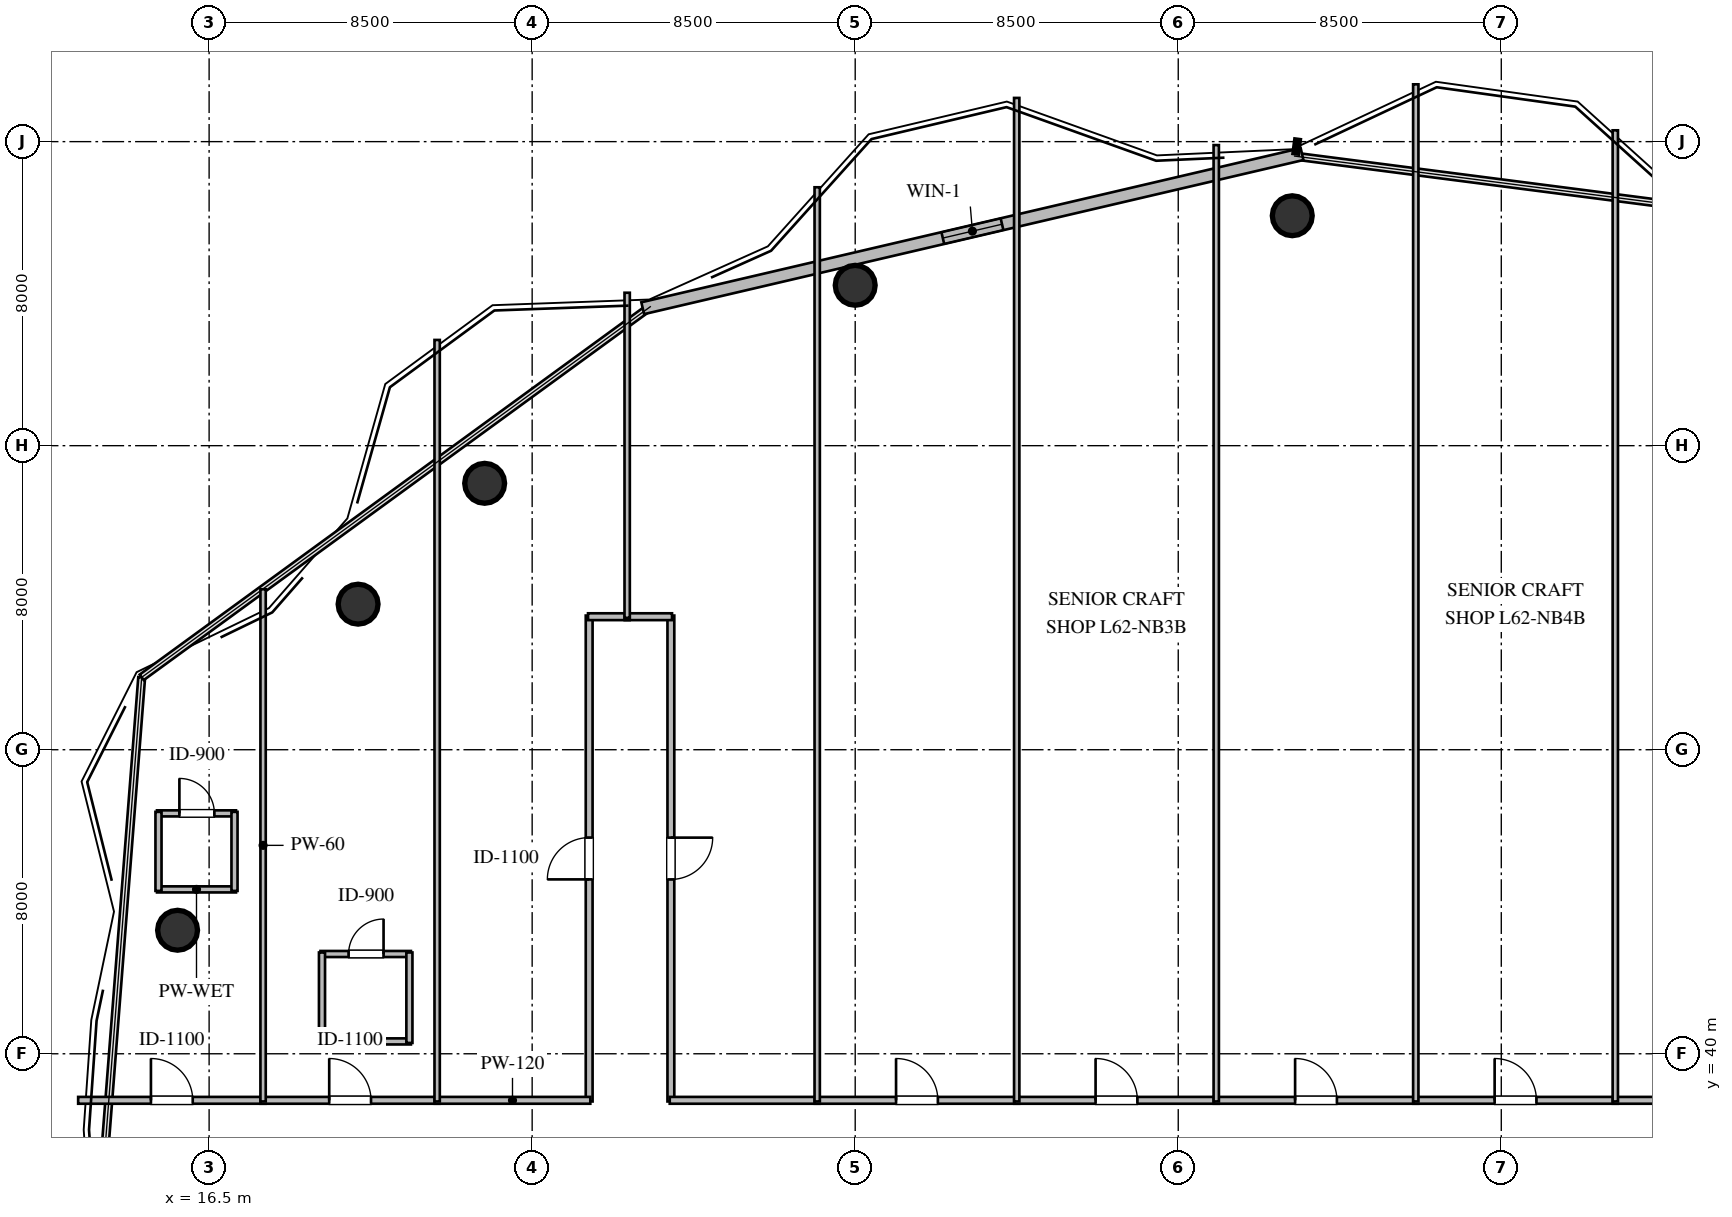
"""IFC4 building model, lengths in metres.
Left out: names, types, materials, properties, quantities, classifications, styles, units other than length and angle.
Written with IfcOpenShell. Run it as: python <this file> out.ifc"""

import sys

from ifc_helpers import new_model, si_unit, direction, frame, frame_2d, origin, origin_2d, place, context, subcontext, project, spatial, rectangle, circle, extrude, element, fill, save


model = new_model("IFC4")
c1 = context("Model", 3, precision=1e-05, world=origin(), true_north=direction((0.0, 1.0)))
c2 = subcontext(c1, "Body", "Model", "MODEL_VIEW")
j1 = project(units=[si_unit("LENGTHUNIT", "METRE"), si_unit("PLANEANGLEUNIT", "RADIAN")], contexts=[c1])
p1 = place(None, origin())
s1 = spatial("IfcSite", under=j1, at=p1, CompositionType="ELEMENT")
p2 = place(p1, origin())
s2 = spatial("IfcBuilding", under=s1, at=p2, CompositionType="ELEMENT")
p3 = place(p2, frame((0.0, 0.0, 235.2)))
s3 = spatial("IfcBuildingStorey", under=s2, at=p3, CompositionType="ELEMENT", Elevation=235.2)
for number, where, z_axis, x_axis in (
    (1, (45.0, 62.05, 0.0), (0.0, 0.0, 1.0), (1.0, 0.0, 0.0)),
    (2, (33.5, 60.22, 0.0), (0.0, 0.0, 1.0), (1.0, 0.0, 0.0)),
    (3, (23.75, 55.01, 0.0), (0.0, 0.0, 1.0), (1.0, 0.0, 0.0)),
    (4, (20.42, 51.83, 0.0), (0.0, 0.0, 1.0), (1.0, 0.0, 0.0)),
    (5, (15.67, 43.25, 0.0), (0.0, 0.0, 1.0), (1.0, 0.0, 0.0)),
):
    element("IfcColumn", number, at=place(p3, frame(where, z_axis=z_axis, x_axis=x_axis)), inside=s3, PredefinedType="COLUMN", context=c2, shape_type="SweptSolid", body=[
        extrude(circle(Radius=0.525, at=origin_2d()), origin(), (0.0, 0.0, 1.0), 3.6),
    ])
p4 = place(p3, frame((27.909, 59.617, 0.0), z_axis=(0.0, 0.0, 1.0), x_axis=(0.973753606594, 0.227604731158, 0.0)))
e6 = element("IfcWall", 6, at=p4, inside=s3, PredefinedType="STANDARD", context=c2, shape_type="SweptSolid", body=[
    extrude(rectangle(XDim=17.817, YDim=0.32, at=frame_2d((8.908, 0.0))), origin(), (0.0, 0.0, 1.0), 3.36),
])
p5 = place(p4, frame((8.109, 0.0, 1.05)))
e7 = element("IfcOpeningElement", 7, at=p5, cuts=e6, PredefinedType="OPENING", context=c2, shape_type="SweptSolid", body=[
    extrude(rectangle(XDim=1.6, YDim=1.5, at=frame_2d((0.8, 0.75))), frame((0.0, 0.17, 0.0), z_axis=(0.0, -1.0, 0.0), x_axis=(1.0, 0.0, 0.0)), (0.0, 0.0, 1.0), 0.34),
])
p6 = place(p3, frame((15.128, 44.325, 0.0), z_axis=(0.0, 0.0, 1.0), x_axis=(1.0, 0.0, 0.0)))
e8 = element("IfcWall", 8, at=p6, inside=s3, PredefinedType="PLUMBINGWALL", context=c2, shape_type="SweptSolid", body=[
    extrude(rectangle(XDim=2.08, YDim=0.16, at=frame_2d((1.04, 0.0))), origin(), (0.0, 0.0, 1.0), 3.36),
])
p7 = place(p3, frame((15.128, 46.325, 0.0), z_axis=(0.0, 0.0, 1.0), x_axis=(1.0, 0.0, 0.0)))
e9 = element("IfcWall", 9, at=p7, inside=s3, PredefinedType="PLUMBINGWALL", context=c2, shape_type="SweptSolid", body=[
    extrude(rectangle(XDim=2.08, YDim=0.16, at=frame_2d((1.04, 0.0))), origin(), (0.0, 0.0, 1.0), 3.36),
])
p8 = place(p7, frame((0.59, 0.0, 0.0)))
e10 = element("IfcOpeningElement", 10, at=p8, cuts=e9, PredefinedType="OPENING", context=c2, shape_type="SweptSolid", body=[
    extrude(rectangle(XDim=0.92, YDim=2.1, at=frame_2d((0.46, 1.05))), frame((0.0, 0.09, 0.0), z_axis=(0.0, -1.0, 0.0), x_axis=(1.0, 0.0, 0.0)), (0.0, 0.0, 1.0), 0.18),
])
for number, where, z_axis, x_axis in (
    (11, (15.168, 44.285, 0.0), (0.0, 0.0, 1.0), (0.0, 1.0, 0.0)),
    (12, (17.168, 44.285, 0.0), (0.0, 0.0, 1.0), (0.0, 1.0, 0.0)),
):
    element("IfcWall", number, at=place(p3, frame(where, z_axis=z_axis, x_axis=x_axis)), inside=s3, PredefinedType="PLUMBINGWALL", context=c2, shape_type="SweptSolid", body=[
        extrude(rectangle(XDim=2.08, YDim=0.16, at=frame_2d((1.04, 0.0))), origin(), (0.0, 0.0, 1.0), 3.36),
    ])
p9 = place(p3, frame((19.43, 40.325, 0.0), z_axis=(0.0, 0.0, 1.0), x_axis=(1.0, 0.0, 0.0)))
e13 = element("IfcWall", 13, at=p9, inside=s3, PredefinedType="PLUMBINGWALL", context=c2, shape_type="SweptSolid", body=[
    extrude(rectangle(XDim=2.38, YDim=0.16, at=frame_2d((1.19, 0.0))), origin(), (0.0, 0.0, 1.0), 3.36),
])
p10 = place(p3, frame((19.43, 42.625, 0.0), z_axis=(0.0, 0.0, 1.0), x_axis=(1.0, 0.0, 0.0)))
e14 = element("IfcWall", 14, at=p10, inside=s3, PredefinedType="PLUMBINGWALL", context=c2, shape_type="SweptSolid", body=[
    extrude(rectangle(XDim=2.38, YDim=0.16, at=frame_2d((1.19, 0.0))), origin(), (0.0, 0.0, 1.0), 3.36),
])
p11 = place(p10, frame((0.74, 0.0, 0.0)))
e15 = element("IfcOpeningElement", 15, at=p11, cuts=e14, PredefinedType="OPENING", context=c2, shape_type="SweptSolid", body=[
    extrude(rectangle(XDim=0.92, YDim=2.1, at=frame_2d((0.46, 1.05))), frame((0.0, 0.09, 0.0), z_axis=(0.0, -1.0, 0.0), x_axis=(1.0, 0.0, 0.0)), (0.0, 0.0, 1.0), 0.18),
])
p12 = place(p3, frame((19.47, 40.285, 0.0), z_axis=(0.0, 0.0, 1.0), x_axis=(0.0, 1.0, 0.0)))
e16 = element("IfcWall", 16, at=p12, inside=s3, PredefinedType="PLUMBINGWALL", context=c2, shape_type="SweptSolid", body=[
    extrude(rectangle(XDim=2.38, YDim=0.16, at=frame_2d((1.19, 0.0))), origin(), (0.0, 0.0, 1.0), 3.36),
])
p13 = place(p3, frame((21.77, 40.285, 0.0), z_axis=(0.0, 0.0, 1.0), x_axis=(0.0, 1.0, 0.0)))
e17 = element("IfcWall", 17, at=p13, inside=s3, PredefinedType="PLUMBINGWALL", context=c2, shape_type="SweptSolid", body=[
    extrude(rectangle(XDim=2.38, YDim=0.16, at=frame_2d((1.19, 0.0))), origin(), (0.0, 0.0, 1.0), 2.806),
])
p14 = place(p3, frame((13.054, 38.775, 0.0), z_axis=(0.0, 0.0, 1.0), x_axis=(1.0, 0.0, 0.0)))
e18 = element("IfcWall", 18, at=p14, inside=s3, PredefinedType="PARTITIONING", context=c2, shape_type="SweptSolid", body=[
    extrude(rectangle(XDim=4.931, YDim=0.18, at=frame_2d((2.466, 0.0))), origin(), (0.0, 0.0, 1.0), 3.36),
])
p15 = place(p14, frame((1.915, 0.0, 0.0)))
e19 = element("IfcOpeningElement", 19, at=p15, cuts=e18, PredefinedType="OPENING", context=c2, shape_type="SweptSolid", body=[
    extrude(rectangle(XDim=1.1, YDim=2.1, at=frame_2d((0.55, 1.05))), frame((0.0, 0.1, 0.0), z_axis=(0.0, -1.0, 0.0), x_axis=(1.0, 0.0, 0.0)), (0.0, 0.0, 1.0), 0.2),
])
p16 = place(p3, frame((17.855, 38.775, 0.0), z_axis=(0.0, 0.0, 1.0), x_axis=(1.0, 0.0, 0.0)))
e20 = element("IfcWall", 20, at=p16, inside=s3, PredefinedType="PARTITIONING", context=c2, shape_type="SweptSolid", body=[
    extrude(rectangle(XDim=4.71, YDim=0.18, at=frame_2d((2.355, 0.0))), origin(), (0.0, 0.0, 1.0), 3.36),
])
p17 = place(p16, frame((1.805, 0.0, 0.0)))
e21 = element("IfcOpeningElement", 21, at=p17, cuts=e20, PredefinedType="OPENING", context=c2, shape_type="SweptSolid", body=[
    extrude(rectangle(XDim=1.1, YDim=2.1, at=frame_2d((0.55, 1.05))), frame((0.0, 0.1, 0.0), z_axis=(0.0, -1.0, 0.0), x_axis=(1.0, 0.0, 0.0)), (0.0, 0.0, 1.0), 0.2),
])
p18 = place(p3, frame((26.5, 38.745, 0.0), z_axis=(0.0, 0.0, 1.0), x_axis=(0.0, 1.0, 0.0)))
e22 = element("IfcWall", 22, at=p18, inside=s3, PredefinedType="PARTITIONING", context=c2, shape_type="SweptSolid", body=[
    extrude(rectangle(XDim=12.785, YDim=0.18, at=frame_2d((6.393, 0.0))), origin(), (0.0, 0.0, 1.0), 3.36),
])
p19 = place(p18, frame((5.843, 0.0, 0.0)))
e23 = element("IfcOpeningElement", 23, at=p19, cuts=e22, PredefinedType="OPENING", context=c2, shape_type="SweptSolid", body=[
    extrude(rectangle(XDim=1.1, YDim=2.1, at=frame_2d((0.55, 1.05))), frame((0.0, 0.1, 0.0), z_axis=(0.0, -1.0, 0.0), x_axis=(1.0, 0.0, 0.0)), (0.0, 0.0, 1.0), 0.2),
])
p20 = place(p3, frame((22.435, 38.775, 0.0), z_axis=(0.0, 0.0, 1.0), x_axis=(1.0, 0.0, 0.0)))
e24 = element("IfcWall", 24, at=p20, inside=s3, PredefinedType="PARTITIONING", context=c2, shape_type="SweptSolid", body=[
    extrude(rectangle(XDim=4.095, YDim=0.18, at=frame_2d((2.047, 0.0))), origin(), (0.0, 0.0, 1.0), 3.36),
])
p21 = place(p3, frame((26.47, 51.5, 0.0), z_axis=(0.0, 0.0, 1.0), x_axis=(1.0, 0.0, 0.0)))
e25 = element("IfcWall", 25, at=p21, inside=s3, PredefinedType="PARTITIONING", context=c2, shape_type="SweptSolid", body=[
    extrude(rectangle(XDim=1.095, YDim=0.18, at=frame_2d((0.547, 0.0))), origin(), (0.0, 0.0, 1.0), 3.36),
])
p22 = place(p3, frame((28.65, 51.53, 0.0), z_axis=(0.0, 0.0, 1.0), x_axis=(0.0, -1.0, 0.0)))
e26 = element("IfcWall", 26, at=p22, inside=s3, PredefinedType="PARTITIONING", context=c2, shape_type="SweptSolid", body=[
    extrude(rectangle(XDim=12.785, YDim=0.18, at=frame_2d((6.393, 0.0))), origin(), (0.0, 0.0, 1.0), 3.36),
])
p23 = place(p22, frame((5.843, 0.0, 0.0)))
e27 = element("IfcOpeningElement", 27, at=p23, cuts=e26, PredefinedType="OPENING", context=c2, shape_type="SweptSolid", body=[
    extrude(rectangle(XDim=1.1, YDim=2.1, at=frame_2d((0.55, 1.05))), frame((0.0, 0.1, 0.0), z_axis=(0.0, -1.0, 0.0), x_axis=(1.0, 0.0, 0.0)), (0.0, 0.0, 1.0), 0.2),
])
p24 = place(p3, frame((28.62, 38.775, 0.0), z_axis=(0.0, 0.0, 1.0), x_axis=(1.0, 0.0, 0.0)))
e28 = element("IfcWall", 28, at=p24, inside=s3, PredefinedType="PARTITIONING", context=c2, shape_type="SweptSolid", body=[
    extrude(rectangle(XDim=3.945, YDim=0.18, at=frame_2d((1.972, 0.0))), origin(), (0.0, 0.0, 1.0), 3.36),
])
p25 = place(p3, frame((27.435, 51.5, 0.0), z_axis=(0.0, 0.0, 1.0), x_axis=(1.0, 0.0, 0.0)))
e29 = element("IfcWall", 29, at=p25, inside=s3, PredefinedType="PARTITIONING", context=c2, shape_type="SweptSolid", body=[
    extrude(rectangle(XDim=1.245, YDim=0.18, at=frame_2d((0.623, 0.0))), origin(), (0.0, 0.0, 1.0), 3.36),
])
p26 = place(p3, frame((32.435, 38.775, 0.0), z_axis=(0.0, 0.0, 1.0), x_axis=(1.0, 0.0, 0.0)))
e30 = element("IfcWall", 30, at=p26, inside=s3, PredefinedType="PARTITIONING", context=c2, shape_type="SweptSolid", body=[
    extrude(rectangle(XDim=5.38, YDim=0.18, at=frame_2d((2.69, 0.0))), origin(), (0.0, 0.0, 1.0), 3.36),
])
p27 = place(p26, frame((2.14, 0.0, 0.0)))
e31 = element("IfcOpeningElement", 31, at=p27, cuts=e30, PredefinedType="OPENING", context=c2, shape_type="SweptSolid", body=[
    extrude(rectangle(XDim=1.1, YDim=2.1, at=frame_2d((0.55, 1.05))), frame((0.0, 0.1, 0.0), z_axis=(0.0, -1.0, 0.0), x_axis=(1.0, 0.0, 0.0)), (0.0, 0.0, 1.0), 0.2),
])
p28 = place(p3, frame((37.685, 38.775, 0.0), z_axis=(0.0, 0.0, 1.0), x_axis=(1.0, 0.0, 0.0)))
e32 = element("IfcWall", 32, at=p28, inside=s3, PredefinedType="PARTITIONING", context=c2, shape_type="SweptSolid", body=[
    extrude(rectangle(XDim=5.38, YDim=0.18, at=frame_2d((2.69, 0.0))), origin(), (0.0, 0.0, 1.0), 3.36),
])
p29 = place(p28, frame((2.14, 0.0, 0.0)))
e33 = element("IfcOpeningElement", 33, at=p29, cuts=e32, PredefinedType="OPENING", context=c2, shape_type="SweptSolid", body=[
    extrude(rectangle(XDim=1.1, YDim=2.1, at=frame_2d((0.55, 1.05))), frame((0.0, 0.1, 0.0), z_axis=(0.0, -1.0, 0.0), x_axis=(1.0, 0.0, 0.0)), (0.0, 0.0, 1.0), 0.2),
])
p30 = place(p3, frame((42.935, 38.775, 0.0), z_axis=(0.0, 0.0, 1.0), x_axis=(1.0, 0.0, 0.0)))
e34 = element("IfcWall", 34, at=p30, inside=s3, PredefinedType="PARTITIONING", context=c2, shape_type="SweptSolid", body=[
    extrude(rectangle(XDim=5.38, YDim=0.18, at=frame_2d((2.69, 0.0))), origin(), (0.0, 0.0, 1.0), 3.36),
])
p31 = place(p30, frame((2.14, 0.0, 0.0)))
e35 = element("IfcOpeningElement", 35, at=p31, cuts=e34, PredefinedType="OPENING", context=c2, shape_type="SweptSolid", body=[
    extrude(rectangle(XDim=1.1, YDim=2.1, at=frame_2d((0.55, 1.05))), frame((0.0, 0.1, 0.0), z_axis=(0.0, -1.0, 0.0), x_axis=(1.0, 0.0, 0.0)), (0.0, 0.0, 1.0), 0.2),
])
p32 = place(p3, frame((48.185, 38.775, 0.0), z_axis=(0.0, 0.0, 1.0), x_axis=(1.0, 0.0, 0.0)))
e36 = element("IfcWall", 36, at=p32, inside=s3, PredefinedType="PARTITIONING", context=c2, shape_type="SweptSolid", body=[
    extrude(rectangle(XDim=5.38, YDim=0.18, at=frame_2d((2.69, 0.0))), origin(), (0.0, 0.0, 1.0), 3.36),
])
p33 = place(p32, frame((2.14, 0.0, 0.0)))
e37 = element("IfcOpeningElement", 37, at=p33, cuts=e36, PredefinedType="OPENING", context=c2, shape_type="SweptSolid", body=[
    extrude(rectangle(XDim=1.1, YDim=2.1, at=frame_2d((0.55, 1.05))), frame((0.0, 0.1, 0.0), z_axis=(0.0, -1.0, 0.0), x_axis=(1.0, 0.0, 0.0)), (0.0, 0.0, 1.0), 0.2),
])
p34 = place(p3, frame((53.435, 38.775, 0.0), z_axis=(0.0, 0.0, 1.0), x_axis=(1.0, 0.0, 0.0)))
e38 = element("IfcWall", 38, at=p34, inside=s3, PredefinedType="PARTITIONING", context=c2, shape_type="SweptSolid", body=[
    extrude(rectangle(XDim=4.88, YDim=0.18, at=frame_2d((2.44, 0.0))), origin(), (0.0, 0.0, 1.0), 3.36),
])
p35 = place(p34, frame((1.89, 0.0, 0.0)))
e39 = element("IfcOpeningElement", 39, at=p35, cuts=e38, PredefinedType="OPENING", context=c2, shape_type="SweptSolid", body=[
    extrude(rectangle(XDim=1.1, YDim=2.1, at=frame_2d((0.55, 1.05))), frame((0.0, 0.1, 0.0), z_axis=(0.0, -1.0, 0.0), x_axis=(1.0, 0.0, 0.0)), (0.0, 0.0, 1.0), 0.2),
])
p36 = place(p3, frame((17.92, 52.222, 0.0), z_axis=(0.0, 0.0, 1.0), x_axis=(0.0, -1.0, 0.0)))
e40 = element("IfcWall", 40, at=p36, inside=s3, PredefinedType="PARTITIONING", context=c2, shape_type="SweptSolid", body=[
    extrude(rectangle(XDim=13.477, YDim=0.14, at=frame_2d((6.739, 0.0))), origin(), (0.0, 0.0, 1.0), 3.36),
])
p37 = place(p3, frame((22.5, 58.782, 0.0), z_axis=(0.0, 0.0, 1.0), x_axis=(0.0, -1.0, 0.0)))
e41 = element("IfcWall", 41, at=p37, inside=s3, PredefinedType="PARTITIONING", context=c2, shape_type="SweptSolid", body=[
    extrude(rectangle(XDim=20.037, YDim=0.14, at=frame_2d((10.019, 0.0))), origin(), (0.0, 0.0, 1.0), 2.806),
])
p38 = place(p3, frame((27.5, 60.024, 0.0), z_axis=(0.0, 0.0, 1.0), x_axis=(0.0, -1.0, 0.0)))
e42 = element("IfcWall", 42, at=p38, inside=s3, PredefinedType="PARTITIONING", context=c2, shape_type="SweptSolid", body=[
    extrude(rectangle(XDim=8.554, YDim=0.14, at=frame_2d((4.277, 0.0))), origin(), (0.0, 0.0, 1.0), 3.36),
])
p39 = place(p3, frame((32.5, 62.799, 0.0), z_axis=(0.0, 0.0, 1.0), x_axis=(0.0, -1.0, 0.0)))
e43 = element("IfcWall", 43, at=p39, inside=s3, PredefinedType="PARTITIONING", context=c2, shape_type="SweptSolid", body=[
    extrude(rectangle(XDim=24.054, YDim=0.14, at=frame_2d((12.027, 0.0))), origin(), (0.0, 0.0, 1.0), 3.36),
])
p40 = place(p3, frame((37.75, 65.15, 0.0), z_axis=(0.0, 0.0, 1.0), x_axis=(0.0, -1.0, 0.0)))
e44 = element("IfcWall", 44, at=p40, inside=s3, PredefinedType="PARTITIONING", context=c2, shape_type="SweptSolid", body=[
    extrude(rectangle(XDim=26.405, YDim=0.14, at=frame_2d((13.202, 0.0))), origin(), (0.0, 0.0, 1.0), 3.36),
])
p41 = place(p3, frame((43.0, 63.909, 0.0), z_axis=(0.0, 0.0, 1.0), x_axis=(0.0, -1.0, 0.0)))
e45 = element("IfcWall", 45, at=p41, inside=s3, PredefinedType="PARTITIONING", context=c2, shape_type="SweptSolid", body=[
    extrude(rectangle(XDim=25.164, YDim=0.14, at=frame_2d((12.582, 0.0))), origin(), (0.0, 0.0, 1.0), 3.36),
])
p42 = place(p3, frame((48.25, 65.508, 0.0), z_axis=(0.0, 0.0, 1.0), x_axis=(0.0, -1.0, 0.0)))
e46 = element("IfcWall", 46, at=p42, inside=s3, PredefinedType="PARTITIONING", context=c2, shape_type="SweptSolid", body=[
    extrude(rectangle(XDim=26.763, YDim=0.14, at=frame_2d((13.381, 0.0))), origin(), (0.0, 0.0, 1.0), 3.36),
])
p43 = place(p3, frame((53.5, 64.298, 0.0), z_axis=(0.0, 0.0, 1.0), x_axis=(0.0, -1.0, 0.0)))
e47 = element("IfcWall", 47, at=p43, inside=s3, PredefinedType="PARTITIONING", context=c2, shape_type="SweptSolid", body=[
    extrude(rectangle(XDim=25.553, YDim=0.14, at=frame_2d((12.776, 0.0))), origin(), (0.0, 0.0, 1.0), 3.36),
])
p44 = place(p5, origin())
e48 = element("IfcWindow", 48, at=p44, inside=s3, PartitioningType="SINGLE_PANEL", PredefinedType="WINDOW", context=c2, shape_type="SweptSolid", body=[
    extrude(rectangle(XDim=1.6, YDim=1.5, at=frame_2d((0.8, 0.75))), frame((0.0, 0.03, 0.0), z_axis=(0.0, -1.0, 0.0), x_axis=(1.0, 0.0, 0.0)), (0.0, 0.0, 1.0), 0.06),
])
fill(e7, e48)
p45 = place(p8, origin())
e49 = element("IfcDoor", 49, at=p45, inside=s3, OperationType="SINGLE_SWING_LEFT", PredefinedType="DOOR", context=c2, shape_type="SweptSolid", body=[
    extrude(rectangle(XDim=0.92, YDim=2.1, at=frame_2d((0.46, 1.05))), frame((0.0, 0.025, 0.0), z_axis=(0.0, -1.0, 0.0), x_axis=(1.0, 0.0, 0.0)), (0.0, 0.0, 1.0), 0.05),
])
fill(e10, e49)
p46 = place(p11, origin())
e50 = element("IfcDoor", 50, at=p46, inside=s3, OperationType="SINGLE_SWING_RIGHT", PredefinedType="DOOR", context=c2, shape_type="SweptSolid", body=[
    extrude(rectangle(XDim=0.92, YDim=2.1, at=frame_2d((0.46, 1.05))), frame((0.0, 0.025, 0.0), z_axis=(0.0, -1.0, 0.0), x_axis=(1.0, 0.0, 0.0)), (0.0, 0.0, 1.0), 0.05),
])
fill(e15, e50)
p47 = place(p15, origin())
e51 = element("IfcDoor", 51, at=p47, inside=s3, OperationType="SINGLE_SWING_LEFT", PredefinedType="DOOR", context=c2, shape_type="SweptSolid", body=[
    extrude(rectangle(XDim=1.1, YDim=2.1, at=frame_2d((0.55, 1.05))), frame((0.0, 0.025, 0.0), z_axis=(0.0, -1.0, 0.0), x_axis=(1.0, 0.0, 0.0)), (0.0, 0.0, 1.0), 0.05),
])
fill(e19, e51)
p48 = place(p17, origin())
e52 = element("IfcDoor", 52, at=p48, inside=s3, OperationType="SINGLE_SWING_LEFT", PredefinedType="DOOR", context=c2, shape_type="SweptSolid", body=[
    extrude(rectangle(XDim=1.1, YDim=2.1, at=frame_2d((0.55, 1.05))), frame((0.0, 0.025, 0.0), z_axis=(0.0, -1.0, 0.0), x_axis=(1.0, 0.0, 0.0)), (0.0, 0.0, 1.0), 0.05),
])
fill(e21, e52)
p49 = place(p19, origin())
e53 = element("IfcDoor", 53, at=p49, inside=s3, OperationType="SINGLE_SWING_LEFT", PredefinedType="DOOR", context=c2, shape_type="SweptSolid", body=[
    extrude(rectangle(XDim=1.1, YDim=2.1, at=frame_2d((0.55, 1.05))), frame((0.0, 0.025, 0.0), z_axis=(0.0, -1.0, 0.0), x_axis=(1.0, 0.0, 0.0)), (0.0, 0.0, 1.0), 0.05),
])
fill(e23, e53)
p50 = place(p23, origin())
e54 = element("IfcDoor", 54, at=p50, inside=s3, OperationType="SINGLE_SWING_LEFT", PredefinedType="DOOR", context=c2, shape_type="SweptSolid", body=[
    extrude(rectangle(XDim=1.1, YDim=2.1, at=frame_2d((0.55, 1.05))), frame((0.0, 0.025, 0.0), z_axis=(0.0, -1.0, 0.0), x_axis=(1.0, 0.0, 0.0)), (0.0, 0.0, 1.0), 0.05),
])
fill(e27, e54)
p51 = place(p27, origin())
e55 = element("IfcDoor", 55, at=p51, inside=s3, OperationType="SINGLE_SWING_LEFT", PredefinedType="DOOR", context=c2, shape_type="SweptSolid", body=[
    extrude(rectangle(XDim=1.1, YDim=2.1, at=frame_2d((0.55, 1.05))), frame((0.0, 0.025, 0.0), z_axis=(0.0, -1.0, 0.0), x_axis=(1.0, 0.0, 0.0)), (0.0, 0.0, 1.0), 0.05),
])
fill(e31, e55)
p52 = place(p29, origin())
e56 = element("IfcDoor", 56, at=p52, inside=s3, OperationType="SINGLE_SWING_LEFT", PredefinedType="DOOR", context=c2, shape_type="SweptSolid", body=[
    extrude(rectangle(XDim=1.1, YDim=2.1, at=frame_2d((0.55, 1.05))), frame((0.0, 0.025, 0.0), z_axis=(0.0, -1.0, 0.0), x_axis=(1.0, 0.0, 0.0)), (0.0, 0.0, 1.0), 0.05),
])
fill(e33, e56)
p53 = place(p31, origin())
e57 = element("IfcDoor", 57, at=p53, inside=s3, OperationType="SINGLE_SWING_LEFT", PredefinedType="DOOR", context=c2, shape_type="SweptSolid", body=[
    extrude(rectangle(XDim=1.1, YDim=2.1, at=frame_2d((0.55, 1.05))), frame((0.0, 0.025, 0.0), z_axis=(0.0, -1.0, 0.0), x_axis=(1.0, 0.0, 0.0)), (0.0, 0.0, 1.0), 0.05),
])
fill(e35, e57)
p54 = place(p33, origin())
e58 = element("IfcDoor", 58, at=p54, inside=s3, OperationType="SINGLE_SWING_LEFT", PredefinedType="DOOR", context=c2, shape_type="SweptSolid", body=[
    extrude(rectangle(XDim=1.1, YDim=2.1, at=frame_2d((0.55, 1.05))), frame((0.0, 0.025, 0.0), z_axis=(0.0, -1.0, 0.0), x_axis=(1.0, 0.0, 0.0)), (0.0, 0.0, 1.0), 0.05),
])
fill(e37, e58)
save(model, sys.argv[1])
